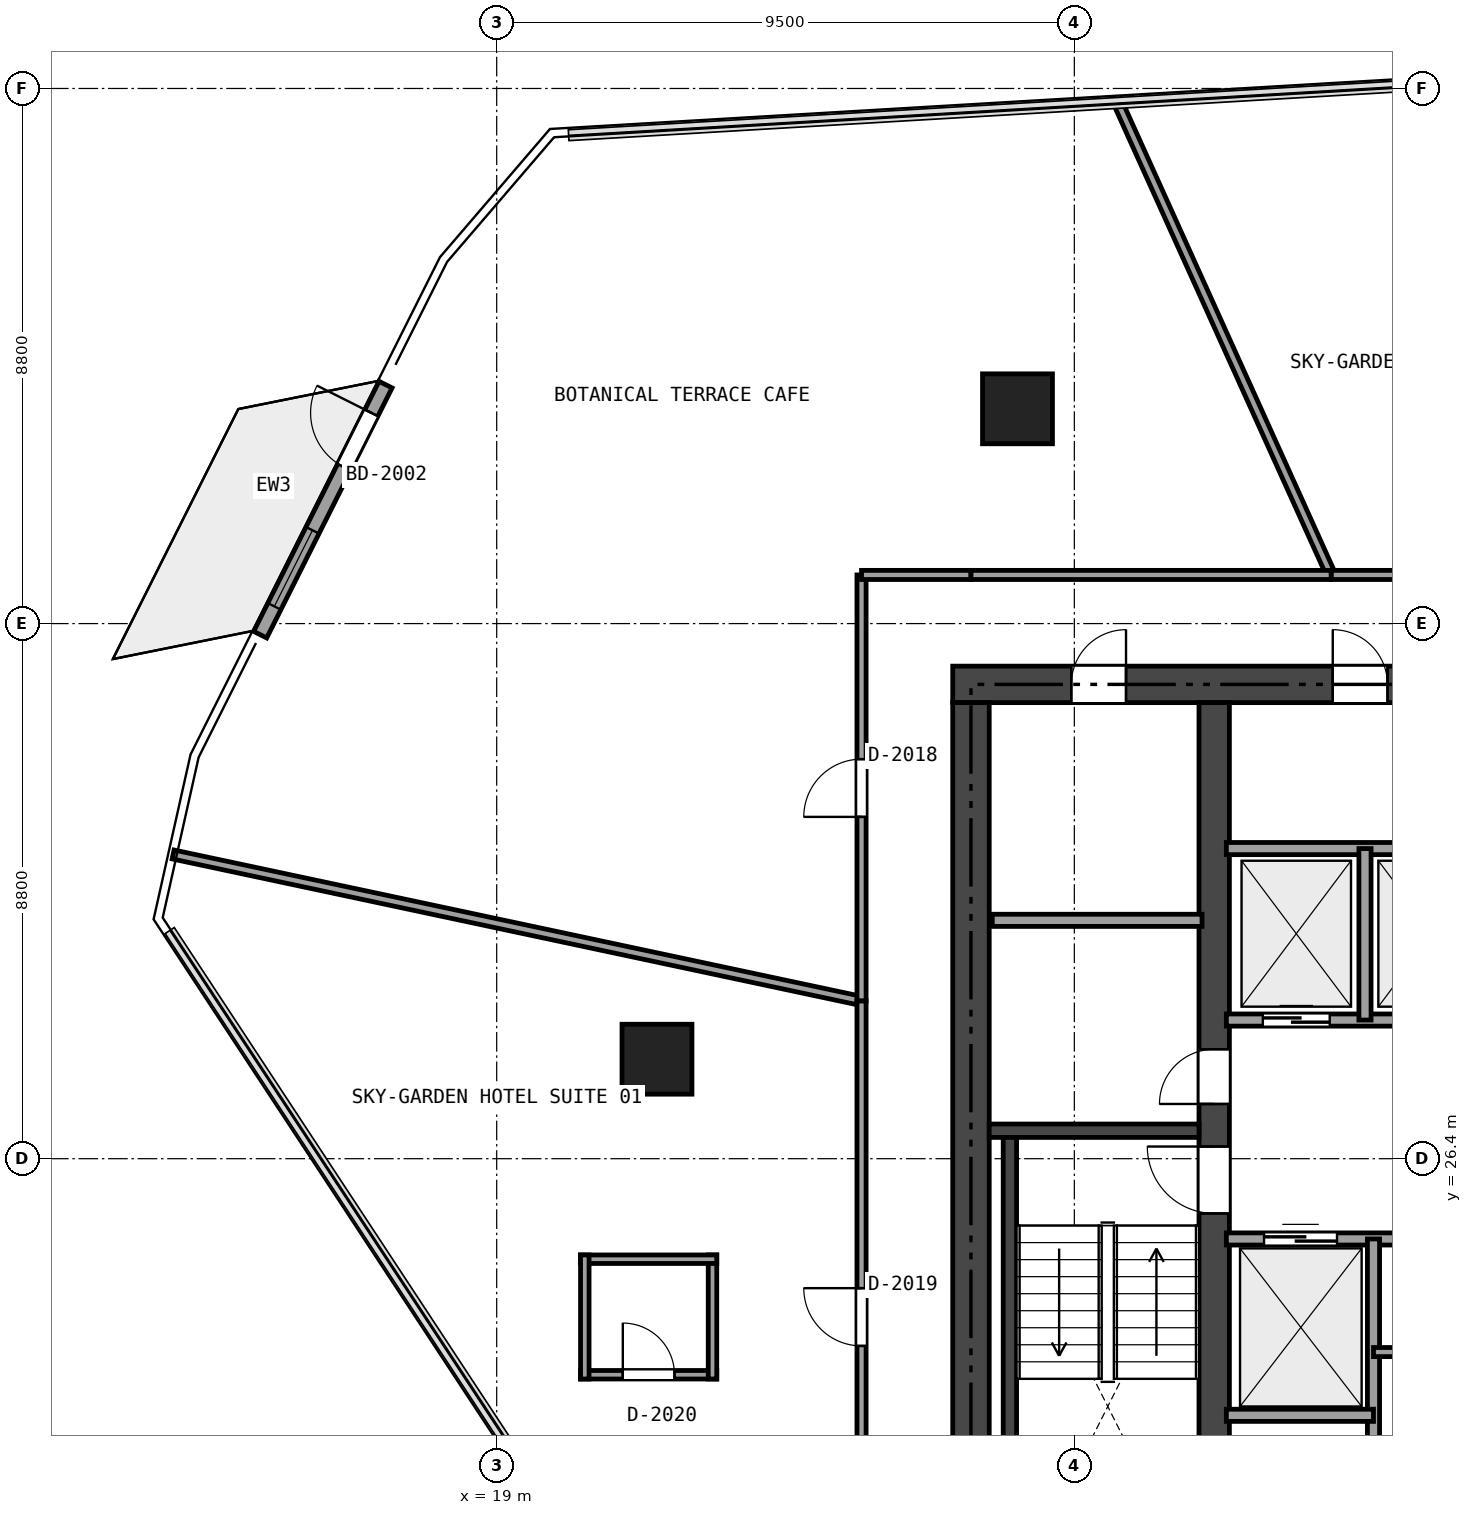
"""IFC4 building model, lengths in metres.
Left out: names, types, materials, properties, quantities, classifications, styles, units other than length and angle.
Written with IfcOpenShell. Run it as: python <this file> out.ifc"""

import sys

from ifc_helpers import new_model, si_unit, direction, frame, frame_2d, origin, origin_2d, place, context, subcontext, project, spatial, rectangle, extrude, element, fill, save


model = new_model("IFC4")
c1 = context("Model", 3, precision=1e-05, world=origin(), true_north=direction((0.0, 1.0)))
c2 = subcontext(c1, "Body", "Model", "MODEL_VIEW")
j1 = project(units=[si_unit("LENGTHUNIT", "METRE"), si_unit("PLANEANGLEUNIT", "RADIAN")], contexts=[c1])
p1 = place(None, origin())
s1 = spatial("IfcSite", under=j1, at=p1, CompositionType="ELEMENT")
p2 = place(p1, origin())
s2 = spatial("IfcBuilding", under=s1, at=p2, CompositionType="ELEMENT")
p3 = place(p2, frame((0.0, 0.0, 79.8)))
s3 = spatial("IfcBuildingStorey", under=s2, at=p3, CompositionType="ELEMENT", Elevation=79.8)
p4 = place(p3, frame((26.5, 34.2, 0.0), z_axis=(0.0, 0.0, 1.0), x_axis=(1.0, 0.0, 0.0)))
e1 = element("IfcWall", 1, at=p4, inside=s3, PredefinedType="SHEAR", context=c2, shape_type="SweptSolid", body=[
    extrude(rectangle(XDim=21.4, YDim=0.6, at=frame_2d((10.7, 0.0))), origin(), (0.0, 0.0, 1.0), 3.17),
])
p5 = place(p4, frame((9.7, 0.0, 0.0)))
e2 = element("IfcOpeningElement", 2, at=p5, cuts=e1, PredefinedType="OPENING", context=c2, shape_type="SweptSolid", body=[
    extrude(rectangle(XDim=1.1, YDim=2.15, at=frame_2d((0.55, 1.075))), frame((0.0, 0.31, 0.0), z_axis=(0.0, -1.0, 0.0), x_axis=(1.0, 0.0, 0.0)), (0.0, 0.0, 1.0), 0.62),
])
p6 = place(p4, frame((1.95, 0.0, 0.0)))
e3 = element("IfcOpeningElement", 3, at=p6, cuts=e1, PredefinedType="OPENING", context=c2, shape_type="SweptSolid", body=[
    extrude(rectangle(XDim=0.9, YDim=2.1, at=frame_2d((0.45, 1.05))), frame((0.0, 0.31, 0.0), z_axis=(0.0, -1.0, 0.0), x_axis=(1.0, 0.0, 0.0)), (0.0, 0.0, 1.0), 0.62),
])
p7 = place(p4, frame((6.25, 0.0, 0.0)))
e4 = element("IfcOpeningElement", 4, at=p7, cuts=e1, PredefinedType="OPENING", context=c2, shape_type="SweptSolid", body=[
    extrude(rectangle(XDim=0.9, YDim=2.1, at=frame_2d((0.45, 1.05))), frame((0.0, 0.31, 0.0), z_axis=(0.0, -1.0, 0.0), x_axis=(1.0, 0.0, 0.0)), (0.0, 0.0, 1.0), 0.62),
])
p8 = place(p3, frame((26.8, 18.9, 0.0), z_axis=(0.0, 0.0, 1.0), x_axis=(0.0, 1.0, 0.0)))
e5 = element("IfcWall", 5, at=p8, inside=s3, PredefinedType="SHEAR", context=c2, shape_type="SweptSolid", body=[
    extrude(rectangle(XDim=15.0, YDim=0.6, at=frame_2d((7.5, 0.0))), origin(), (0.0, 0.0, 1.0), 3.17),
])
p9 = place(p3, frame((30.8, 18.9, 0.0), z_axis=(0.0, 0.0, 1.0), x_axis=(0.0, 1.0, 0.0)))
e6 = element("IfcWall", 6, at=p9, inside=s3, PredefinedType="SHEAR", context=c2, shape_type="SweptSolid", body=[
    extrude(rectangle(XDim=15.0, YDim=0.5, at=frame_2d((7.5, 0.0))), origin(), (0.0, 0.0, 1.0), 3.17),
])
p10 = place(p9, frame((6.6, 0.0, 0.0)))
e7 = element("IfcOpeningElement", 7, at=p10, cuts=e6, PredefinedType="OPENING", context=c2, shape_type="SweptSolid", body=[
    extrude(rectangle(XDim=1.1, YDim=2.15, at=frame_2d((0.55, 1.075))), frame((0.0, 0.26, 0.0), z_axis=(0.0, -1.0, 0.0), x_axis=(1.0, 0.0, 0.0)), (0.0, 0.0, 1.0), 0.52),
])
p11 = place(p9, frame((8.4, 0.0, 0.0)))
e8 = element("IfcOpeningElement", 8, at=p11, cuts=e6, PredefinedType="OPENING", context=c2, shape_type="SweptSolid", body=[
    extrude(rectangle(XDim=0.9, YDim=2.1, at=frame_2d((0.45, 1.05))), frame((0.0, 0.26, 0.0), z_axis=(0.0, -1.0, 0.0), x_axis=(1.0, 0.0, 0.0)), (0.0, 0.0, 1.0), 0.52),
])
p12 = place(p3, frame((27.1, 26.86, 0.0), z_axis=(0.0, 0.0, 1.0), x_axis=(1.0, 0.0, 0.0)))
e9 = element("IfcWall", 9, at=p12, inside=s3, PredefinedType="SHEAR", context=c2, shape_type="SweptSolid", body=[
    extrude(rectangle(XDim=3.45, YDim=0.22, at=frame_2d((1.725, 0.0))), origin(), (0.0, 0.0, 1.0), 3.17),
])
p13 = place(p3, frame((27.44, 19.35, 0.0), z_axis=(0.0, 0.0, 1.0), x_axis=(0.0, 1.0, 0.0)))
e10 = element("IfcWall", 10, at=p13, inside=s3, PredefinedType="SHEAR", context=c2, shape_type="SweptSolid", body=[
    extrude(rectangle(XDim=7.4, YDim=0.22, at=frame_2d((3.7, 0.0))), origin(), (0.0, 0.0, 1.0), 3.17),
])
for number, where, z_axis, x_axis in (
    (11, (27.565, 38.732, 0.0), (0.0, 0.0, 1.0), (1.0, 0.0, 0.0)),
    (12, (21.636, 28.036, 0.0), (0.0, 0.0, 1.0), (1.0, 0.0, 0.0)),
):
    element("IfcColumn", number, at=place(p3, frame(where, z_axis=z_axis, x_axis=x_axis)), inside=s3, PredefinedType="COLUMN", context=c2, shape_type="SweptSolid", body=[
        extrude(rectangle(XDim=1.15, YDim=1.15, at=origin_2d()), origin(), (0.0, 0.0, 1.0), 3.17),
    ])
p14 = place(p3, frame((15.11, 35.018, 0.0), z_axis=(0.0, 0.0, 1.0), x_axis=(0.448274788455, 0.893895807147, 0.0)))
e13 = element("IfcWall", 13, at=p14, inside=s3, PredefinedType="SOLIDWALL", context=c2, shape_type="SweptSolid", body=[
    extrude(rectangle(XDim=4.6, YDim=0.24, at=frame_2d((2.3, 0.0))), origin(), (0.0, 0.0, 1.0), 3.17),
])
p15 = place(p14, frame((3.08, 0.0, 0.0)))
e14 = element("IfcOpeningElement", 14, at=p15, cuts=e13, PredefinedType="OPENING", context=c2, shape_type="SweptSolid", body=[
    extrude(rectangle(XDim=1.0, YDim=2.15, at=frame_2d((0.5, 1.075))), frame((0.0, 0.13, 0.0), z_axis=(0.0, -1.0, 0.0), x_axis=(1.0, 0.0, 0.0)), (0.0, 0.0, 1.0), 0.26),
])
p16 = place(p14, frame((0.52, 0.0, 0.2)))
e15 = element("IfcOpeningElement", 15, at=p16, cuts=e13, PredefinedType="OPENING", context=c2, shape_type="SweptSolid", body=[
    extrude(rectangle(XDim=1.4, YDim=1.95, at=frame_2d((0.7, 0.975))), frame((0.0, 0.13, 0.0), z_axis=(0.0, -1.0, 0.0), x_axis=(1.0, 0.0, 0.0)), (0.0, 0.0, 1.0), 0.26),
])
p17 = place(p3, frame((27.15, 30.32, 0.0), z_axis=(0.0, 0.0, 1.0), x_axis=(1.0, 0.0, 0.0)))
e16 = element("IfcWall", 16, at=p17, inside=s3, PredefinedType="SOLIDWALL", context=c2, shape_type="SweptSolid", body=[
    extrude(rectangle(XDim=3.45, YDim=0.2, at=frame_2d((1.725, 0.0))), origin(), (0.0, 0.0, 1.0), 3.17),
])
p18 = place(p3, frame((31.0, 28.68, 0.0), z_axis=(0.0, 0.0, 1.0), x_axis=(1.0, 0.0, 0.0)))
e17 = element("IfcWall", 17, at=p18, inside=s3, PredefinedType="SOLIDWALL", context=c2, shape_type="SweptSolid", body=[
    extrude(rectangle(XDim=4.42, YDim=0.2, at=frame_2d((2.21, 0.0))), origin(), (0.0, 0.0, 1.0), 3.17),
])
p19 = place(p18, frame((0.6, 0.0, 0.0)))
e18 = element("IfcOpeningElement", 18, at=p19, cuts=e17, PredefinedType="OPENING", context=c2, shape_type="SweptSolid", body=[
    extrude(rectangle(XDim=1.1, YDim=2.15, at=frame_2d((0.55, 1.075))), frame((0.0, 0.11, 0.0), z_axis=(0.0, -1.0, 0.0), x_axis=(1.0, 0.0, 0.0)), (0.0, 0.0, 1.0), 0.22),
])
p20 = place(p18, frame((2.85, 0.0, 0.0)))
e19 = element("IfcOpeningElement", 19, at=p20, cuts=e17, PredefinedType="OPENING", context=c2, shape_type="SweptSolid", body=[
    extrude(rectangle(XDim=1.1, YDim=2.15, at=frame_2d((0.55, 1.075))), frame((0.0, 0.11, 0.0), z_axis=(0.0, -1.0, 0.0), x_axis=(1.0, 0.0, 0.0)), (0.0, 0.0, 1.0), 0.22),
])
p21 = place(p3, frame((31.0, 31.5, 0.0), z_axis=(0.0, 0.0, 1.0), x_axis=(1.0, 0.0, 0.0)))
e20 = element("IfcWall", 20, at=p21, inside=s3, PredefinedType="SOLIDWALL", context=c2, shape_type="SweptSolid", body=[
    extrude(rectangle(XDim=4.42, YDim=0.2, at=frame_2d((2.21, 0.0))), origin(), (0.0, 0.0, 1.0), 3.17),
])
p22 = place(p3, frame((33.28, 28.68, 0.0), z_axis=(0.0, 0.0, 1.0), x_axis=(0.0, 1.0, 0.0)))
e21 = element("IfcWall", 21, at=p22, inside=s3, PredefinedType="SOLIDWALL", context=c2, shape_type="SweptSolid", body=[
    extrude(rectangle(XDim=2.82, YDim=0.2, at=frame_2d((1.41, 0.0))), origin(), (0.0, 0.0, 1.0), 3.17),
])
p23 = place(p3, frame((31.0, 25.08, 0.0), z_axis=(0.0, 0.0, 1.0), x_axis=(1.0, 0.0, 0.0)))
e22 = element("IfcWall", 22, at=p23, inside=s3, PredefinedType="SOLIDWALL", context=c2, shape_type="SweptSolid", body=[
    extrude(rectangle(XDim=4.42, YDim=0.2, at=frame_2d((2.21, 0.0))), origin(), (0.0, 0.0, 1.0), 3.17),
])
p24 = place(p23, frame((3.0, 0.0, 0.0)))
e23 = element("IfcOpeningElement", 23, at=p24, cuts=e22, PredefinedType="OPENING", context=c2, shape_type="SweptSolid", body=[
    extrude(rectangle(XDim=0.9, YDim=2.1, at=frame_2d((0.45, 1.05))), frame((0.0, 0.11, 0.0), z_axis=(0.0, -1.0, 0.0), x_axis=(1.0, 0.0, 0.0)), (0.0, 0.0, 1.0), 0.22),
])
p25 = place(p23, frame((0.62, 0.0, 0.0)))
e24 = element("IfcOpeningElement", 24, at=p25, cuts=e22, PredefinedType="OPENING", context=c2, shape_type="SweptSolid", body=[
    extrude(rectangle(XDim=1.2, YDim=2.15, at=frame_2d((0.6, 1.075))), frame((0.0, 0.11, 0.0), z_axis=(0.0, -1.0, 0.0), x_axis=(1.0, 0.0, 0.0)), (0.0, 0.0, 1.0), 0.22),
])
p26 = place(p3, frame((33.42, 18.95, 0.0), z_axis=(0.0, 0.0, 1.0), x_axis=(0.0, 1.0, 0.0)))
e25 = element("IfcWall", 25, at=p26, inside=s3, PredefinedType="SOLIDWALL", context=c2, shape_type="SweptSolid", body=[
    extrude(rectangle(XDim=6.13, YDim=0.2, at=frame_2d((3.065, 0.0))), origin(), (0.0, 0.0, 1.0), 2.691),
])
p27 = place(p3, frame((31.0, 22.18, 0.0), z_axis=(0.0, 0.0, 1.0), x_axis=(1.0, 0.0, 0.0)))
e26 = element("IfcWall", 26, at=p27, inside=s3, PredefinedType="SOLIDWALL", context=c2, shape_type="SweptSolid", body=[
    extrude(rectangle(XDim=2.42, YDim=0.2, at=frame_2d((1.21, 0.0))), origin(), (0.0, 0.0, 1.0), 3.17),
])
p28 = place(p3, frame((33.42, 23.22, 0.0), z_axis=(0.0, 0.0, 1.0), x_axis=(1.0, 0.0, 0.0)))
e27 = element("IfcWall", 27, at=p28, inside=s3, PredefinedType="PARTITIONING", context=c2, shape_type="SweptSolid", body=[
    extrude(rectangle(XDim=2.0, YDim=0.15, at=frame_2d((1.0, 0.0))), origin(), (0.0, 0.0, 1.0), 3.17),
])
p29 = place(p3, frame((20.379, 22.847, 0.0), z_axis=(0.0, 0.0, 1.0), x_axis=(1.0, 0.0, 0.0)))
e28 = element("IfcWall", 28, at=p29, inside=s3, PredefinedType="PARTITIONING", context=c2, shape_type="SweptSolid", body=[
    extrude(rectangle(XDim=2.24, YDim=0.14, at=frame_2d((1.12, 0.0))), origin(), (0.0, 0.0, 1.0), 2.455),
])
p30 = place(p29, frame((0.695, 0.0, 0.0)))
e29 = element("IfcOpeningElement", 29, at=p30, cuts=e28, PredefinedType="OPENING", context=c2, shape_type="SweptSolid", body=[
    extrude(rectangle(XDim=0.85, YDim=2.1, at=frame_2d((0.425, 1.05))), frame((0.0, 0.08, 0.0), z_axis=(0.0, -1.0, 0.0), x_axis=(1.0, 0.0, 0.0)), (0.0, 0.0, 1.0), 0.16),
])
p31 = place(p3, frame((22.549, 22.777, 0.0), z_axis=(0.0, 0.0, 1.0), x_axis=(0.0, 1.0, 0.0)))
e30 = element("IfcWall", 30, at=p31, inside=s3, PredefinedType="PARTITIONING", context=c2, shape_type="SweptSolid", body=[
    extrude(rectangle(XDim=2.04, YDim=0.14, at=frame_2d((1.02, 0.0))), origin(), (0.0, 0.0, 1.0), 2.455),
])
p32 = place(p3, frame((22.619, 24.747, 0.0), z_axis=(0.0, 0.0, 1.0), x_axis=(-1.0, 0.0, 0.0)))
e31 = element("IfcWall", 31, at=p32, inside=s3, PredefinedType="PARTITIONING", context=c2, shape_type="SweptSolid", body=[
    extrude(rectangle(XDim=2.24, YDim=0.14, at=frame_2d((1.12, 0.0))), origin(), (0.0, 0.0, 1.0), 2.455),
])
p33 = place(p3, frame((20.449, 24.817, 0.0), z_axis=(0.0, 0.0, 1.0), x_axis=(0.0, -1.0, 0.0)))
e32 = element("IfcWall", 32, at=p33, inside=s3, PredefinedType="PARTITIONING", context=c2, shape_type="SweptSolid", body=[
    extrude(rectangle(XDim=2.04, YDim=0.14, at=frame_2d((1.02, 0.0))), origin(), (0.0, 0.0, 1.0), 3.17),
])
p34 = place(p3, frame((29.197, 43.807, 0.0), z_axis=(0.0, 0.0, 1.0), x_axis=(0.411605049409, -0.911362322735, 0.0)))
e33 = element("IfcWall", 33, at=p34, inside=s3, PredefinedType="PARTITIONING", context=c2, shape_type="SweptSolid", body=[
    extrude(rectangle(XDim=8.566, YDim=0.15, at=frame_2d((4.283, 0.0))), origin(), (0.0, 0.0, 1.0), 2.455),
])
p35 = place(p3, frame((32.723, 36.0, 0.0), z_axis=(0.0, 0.0, 1.0), x_axis=(1.0, 0.0, 0.0)))
e34 = element("IfcWall", 34, at=p35, inside=s3, PredefinedType="PARTITIONING", context=c2, shape_type="SweptSolid", body=[
    extrude(rectangle(XDim=8.954, YDim=0.15, at=frame_2d((4.477, 0.0))), origin(), (0.0, 0.0, 1.0), 2.467),
])
p36 = place(p35, frame((4.002, 0.0, 0.0)))
e35 = element("IfcOpeningElement", 35, at=p36, cuts=e34, PredefinedType="OPENING", context=c2, shape_type="SweptSolid", body=[
    extrude(rectangle(XDim=0.95, YDim=2.15, at=frame_2d((0.475, 1.075))), frame((0.0, 0.085, 0.0), z_axis=(0.0, -1.0, 0.0), x_axis=(1.0, 0.0, 0.0)), (0.0, 0.0, 1.0), 0.17),
])
p37 = place(p3, frame((13.678, 31.403, 0.0), z_axis=(0.0, 0.0, 1.0), x_axis=(0.978084549895, -0.208208100842, 0.0)))
e36 = element("IfcWall", 36, at=p37, inside=s3, PredefinedType="PARTITIONING", context=c2, shape_type="SweptSolid", body=[
    extrude(rectangle(XDim=11.576, YDim=0.15, at=frame_2d((5.788, 0.0))), origin(), (0.0, 0.0, 1.0), 2.455),
])
p38 = place(p3, frame((25.0, 28.993, 0.0), z_axis=(0.0, 0.0, 1.0), x_axis=(0.0, 1.0, 0.0)))
e37 = element("IfcWall", 37, at=p38, inside=s3, PredefinedType="PARTITIONING", context=c2, shape_type="SweptSolid", body=[
    extrude(rectangle(XDim=7.007, YDim=0.15, at=frame_2d((3.503, 0.0))), origin(), (0.0, 0.0, 1.0), 2.455),
])
p39 = place(p38, frame((3.028, 0.0, 0.0)))
e38 = element("IfcOpeningElement", 38, at=p39, cuts=e37, PredefinedType="OPENING", context=c2, shape_type="SweptSolid", body=[
    extrude(rectangle(XDim=0.95, YDim=2.15, at=frame_2d((0.475, 1.075))), frame((0.0, 0.085, 0.0), z_axis=(0.0, -1.0, 0.0), x_axis=(1.0, 0.0, 0.0)), (0.0, 0.0, 1.0), 0.17),
])
p40 = place(p3, frame((25.0, 36.0, 0.0), z_axis=(0.0, 0.0, 1.0), x_axis=(1.0, 0.0, 0.0)))
e39 = element("IfcWall", 39, at=p40, inside=s3, PredefinedType="PARTITIONING", context=c2, shape_type="SweptSolid", body=[
    extrude(rectangle(XDim=1.8, YDim=0.15, at=frame_2d((0.9, 0.0))), origin(), (0.0, 0.0, 1.0), 2.455),
])
p41 = place(p3, frame((26.8, 36.0, 0.0), z_axis=(0.0, 0.0, 1.0), x_axis=(1.0, 0.0, 0.0)))
e40 = element("IfcWall", 40, at=p41, inside=s3, PredefinedType="PARTITIONING", context=c2, shape_type="SweptSolid", body=[
    extrude(rectangle(XDim=5.923, YDim=0.15, at=frame_2d((2.961, 0.0))), origin(), (0.0, 0.0, 1.0), 2.467),
])
p42 = place(p3, frame((25.0, 18.6, 0.0), z_axis=(0.0, 0.0, 1.0), x_axis=(0.0, 1.0, 0.0)))
e41 = element("IfcWall", 41, at=p42, inside=s3, PredefinedType="PARTITIONING", context=c2, shape_type="SweptSolid", body=[
    extrude(rectangle(XDim=10.393, YDim=0.15, at=frame_2d((5.196, 0.0))), origin(), (0.0, 0.0, 1.0), 2.467),
])
p43 = place(p42, frame((4.721, 0.0, 0.0)))
e42 = element("IfcOpeningElement", 42, at=p43, cuts=e41, PredefinedType="OPENING", context=c2, shape_type="SweptSolid", body=[
    extrude(rectangle(XDim=0.95, YDim=2.15, at=frame_2d((0.475, 1.075))), frame((0.0, 0.085, 0.0), z_axis=(0.0, -1.0, 0.0), x_axis=(1.0, 0.0, 0.0)), (0.0, 0.0, 1.0), 0.17),
])
p44 = place(p15, origin())
e43 = element("IfcDoor", 43, at=p44, inside=s3, OperationType="SINGLE_SWING_RIGHT", PredefinedType="DOOR", context=c2, shape_type="SweptSolid", body=[
    extrude(rectangle(XDim=1.0, YDim=2.15, at=frame_2d((0.5, 1.075))), frame((0.0, 0.025, 0.0), z_axis=(0.0, -1.0, 0.0), x_axis=(1.0, 0.0, 0.0)), (0.0, 0.0, 1.0), 0.05),
])
fill(e14, e43)
p45 = place(p16, origin())
e44 = element("IfcWindow", 44, at=p45, inside=s3, PartitioningType="SINGLE_PANEL", PredefinedType="WINDOW", context=c2, shape_type="SweptSolid", body=[
    extrude(rectangle(XDim=1.4, YDim=1.95, at=frame_2d((0.7, 0.975))), frame((0.0, 0.03, 0.0), z_axis=(0.0, -1.0, 0.0), x_axis=(1.0, 0.0, 0.0)), (0.0, 0.0, 1.0), 0.06),
])
fill(e15, e44)
p46 = place(p10, origin())
e45 = element("IfcDoor", 45, at=p46, inside=s3, OperationType="SINGLE_SWING_RIGHT", PredefinedType="DOOR", context=c2, shape_type="SweptSolid", body=[
    extrude(rectangle(XDim=1.1, YDim=2.15, at=frame_2d((0.55, 1.075))), frame((0.0, 0.025, 0.0), z_axis=(0.0, -1.0, 0.0), x_axis=(1.0, 0.0, 0.0)), (0.0, 0.0, 1.0), 0.05),
])
fill(e7, e45)
p47 = place(p11, origin())
e46 = element("IfcDoor", 46, at=p47, inside=s3, OperationType="SINGLE_SWING_LEFT", PredefinedType="DOOR", context=c2, shape_type="SweptSolid", body=[
    extrude(rectangle(XDim=0.9, YDim=2.1, at=frame_2d((0.45, 1.05))), frame((0.0, 0.025, 0.0), z_axis=(0.0, -1.0, 0.0), x_axis=(1.0, 0.0, 0.0)), (0.0, 0.0, 1.0), 0.05),
])
fill(e8, e46)
p48 = place(p6, origin())
e47 = element("IfcDoor", 47, at=p48, inside=s3, OperationType="SINGLE_SWING_RIGHT", PredefinedType="DOOR", context=c2, shape_type="SweptSolid", body=[
    extrude(rectangle(XDim=0.9, YDim=2.1, at=frame_2d((0.45, 1.05))), frame((0.0, 0.025, 0.0), z_axis=(0.0, -1.0, 0.0), x_axis=(1.0, 0.0, 0.0)), (0.0, 0.0, 1.0), 0.05),
])
fill(e3, e47)
p49 = place(p7, origin())
e48 = element("IfcDoor", 48, at=p49, inside=s3, OperationType="SINGLE_SWING_LEFT", PredefinedType="DOOR", context=c2, shape_type="SweptSolid", body=[
    extrude(rectangle(XDim=0.9, YDim=2.1, at=frame_2d((0.45, 1.05))), frame((0.0, 0.025, 0.0), z_axis=(0.0, -1.0, 0.0), x_axis=(1.0, 0.0, 0.0)), (0.0, 0.0, 1.0), 0.05),
])
fill(e4, e48)
p50 = place(p19, origin())
e49 = element("IfcDoor", 49, at=p50, inside=s3, OperationType="SLIDING_TO_LEFT", PredefinedType="DOOR", context=c2, shape_type="SweptSolid", body=[
    extrude(rectangle(XDim=1.1, YDim=2.15, at=frame_2d((0.55, 1.075))), frame((0.0, 0.025, 0.0), z_axis=(0.0, -1.0, 0.0), x_axis=(1.0, 0.0, 0.0)), (0.0, 0.0, 1.0), 0.05),
])
fill(e18, e49)
p51 = place(p25, origin())
e50 = element("IfcDoor", 50, at=p51, inside=s3, OperationType="SLIDING_TO_LEFT", PredefinedType="DOOR", context=c2, shape_type="SweptSolid", body=[
    extrude(rectangle(XDim=1.2, YDim=2.15, at=frame_2d((0.6, 1.075))), frame((0.0, 0.025, 0.0), z_axis=(0.0, -1.0, 0.0), x_axis=(1.0, 0.0, 0.0)), (0.0, 0.0, 1.0), 0.05),
])
fill(e24, e50)
p52 = place(p39, origin())
e51 = element("IfcDoor", 51, at=p52, inside=s3, OperationType="SINGLE_SWING_LEFT", PredefinedType="DOOR", context=c2, shape_type="SweptSolid", body=[
    extrude(rectangle(XDim=0.95, YDim=2.15, at=frame_2d((0.475, 1.075))), frame((0.0, 0.025, 0.0), z_axis=(0.0, -1.0, 0.0), x_axis=(1.0, 0.0, 0.0)), (0.0, 0.0, 1.0), 0.05),
])
fill(e38, e51)
p53 = place(p43, origin())
e52 = element("IfcDoor", 52, at=p53, inside=s3, OperationType="SINGLE_SWING_RIGHT", PredefinedType="DOOR", context=c2, shape_type="SweptSolid", body=[
    extrude(rectangle(XDim=0.95, YDim=2.15, at=frame_2d((0.475, 1.075))), frame((0.0, 0.025, 0.0), z_axis=(0.0, -1.0, 0.0), x_axis=(1.0, 0.0, 0.0)), (0.0, 0.0, 1.0), 0.05),
])
fill(e42, e52)
p54 = place(p30, origin())
e53 = element("IfcDoor", 53, at=p54, inside=s3, OperationType="SINGLE_SWING_LEFT", PredefinedType="DOOR", context=c2, shape_type="SweptSolid", body=[
    extrude(rectangle(XDim=0.85, YDim=2.1, at=frame_2d((0.425, 1.05))), frame((0.0, 0.025, 0.0), z_axis=(0.0, -1.0, 0.0), x_axis=(1.0, 0.0, 0.0)), (0.0, 0.0, 1.0), 0.05),
])
fill(e29, e53)
save(model, sys.argv[1])
